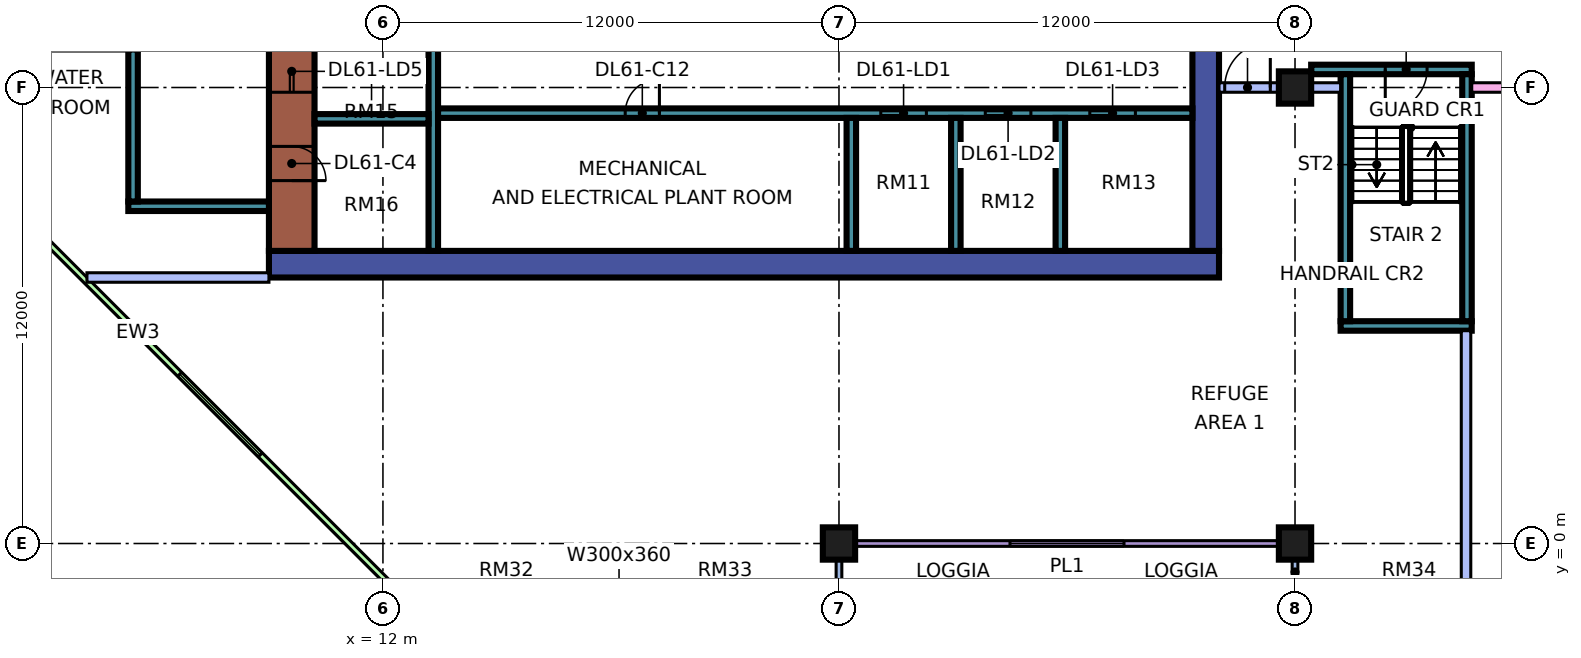
"""IFC4 building model, lengths in metres.
Left out: names, types, materials, properties, quantities, classifications, styles, units other than length and angle.
Written with IfcOpenShell. Run it as: python <this file> out.ifc"""

import sys

from ifc_helpers import new_model, si_unit, direction, frame, frame_2d, origin, origin_2d, place, context, subcontext, project, spatial, rectangle, extrude, element, fill, save


model = new_model("IFC4")
c1 = context("Model", 3, precision=1e-05, world=origin(), true_north=direction((0.0, 1.0)))
c2 = subcontext(c1, "Body", "Model", "MODEL_VIEW")
j1 = project(units=[si_unit("LENGTHUNIT", "METRE"), si_unit("PLANEANGLEUNIT", "RADIAN")], contexts=[c1])
p1 = place(None, origin())
s1 = spatial("IfcSite", under=j1, at=p1, CompositionType="ELEMENT")
p2 = place(p1, origin())
s2 = spatial("IfcBuilding", under=s1, at=p2, CompositionType="ELEMENT")
p3 = place(p2, frame((0.0, 0.0, 256.65)))
s3 = spatial("IfcBuildingStorey", under=s2, at=p3, CompositionType="ELEMENT", Elevation=256.65)
for number, where, z_axis, x_axis in (
    (1, (24.0, 0.0, 0.0), (0.0, 0.0, 1.0), (1.0, 0.0, 0.0)),
    (2, (36.0, 0.0, 0.0), (0.0, 0.0, 1.0), (1.0, 0.0, 0.0)),
    (3, (36.0, 12.0, 0.0), (0.0, 0.0, 1.0), (1.0, 0.0, 0.0)),
):
    element("IfcColumn", number, at=place(p3, frame(where, z_axis=z_axis, x_axis=x_axis)), inside=s3, PredefinedType="COLUMN", context=c2, shape_type="SweptSolid", body=[
        extrude(rectangle(XDim=0.85, YDim=0.85, at=origin_2d()), origin(), (0.0, 0.0, 1.0), 5.5),
    ])
p4 = place(p3, frame((9.0, 7.35, 0.0), z_axis=(0.0, 0.0, 1.0), x_axis=(1.0, 0.0, 0.0)))
e4 = element("IfcWall", 4, at=p4, inside=s3, PredefinedType="SHEAR", context=c2, shape_type="SweptSolid", body=[
    extrude(rectangle(XDim=25.0, YDim=0.7, at=frame_2d((12.5, 0.0))), origin(), (0.0, 0.0, 1.0), 5.5),
])
p5 = place(p3, frame((9.6, 7.7, 0.0), z_axis=(0.0, 0.0, 1.0), x_axis=(0.0, 1.0, 0.0)))
e5 = element("IfcWall", 5, at=p5, inside=s3, PredefinedType="SHEAR", context=c2, shape_type="SweptSolid", body=[
    extrude(rectangle(XDim=11.6, YDim=1.2, at=frame_2d((5.8, 0.0))), origin(), (0.0, 0.0, 1.0), 5.5),
])
p6 = place(p5, frame((4.175, 0.0, 0.0)))
e6 = element("IfcOpeningElement", 6, at=p6, cuts=e5, PredefinedType="OPENING", context=c2, shape_type="SweptSolid", body=[
    extrude(rectangle(XDim=1.1, YDim=2.2, at=frame_2d((0.55, 1.1))), frame((0.0, 0.61, 0.0), z_axis=(0.0, -1.0, 0.0), x_axis=(1.0, 0.0, 0.0)), (0.0, 0.0, 1.0), 1.22),
])
p7 = place(p5, frame((6.675, 0.0, 0.0)))
e7 = element("IfcOpeningElement", 7, at=p7, cuts=e5, PredefinedType="OPENING", context=c2, shape_type="SweptSolid", body=[
    extrude(rectangle(XDim=1.1, YDim=2.2, at=frame_2d((0.55, 1.1))), frame((0.0, 0.61, 0.0), z_axis=(0.0, -1.0, 0.0), x_axis=(1.0, 0.0, 0.0)), (0.0, 0.0, 1.0), 1.22),
])
p8 = place(p5, frame((9.55, 0.0, 0.0)))
e8 = element("IfcOpeningElement", 8, at=p8, cuts=e5, PredefinedType="OPENING", context=c2, shape_type="SweptSolid", body=[
    extrude(rectangle(XDim=1.1, YDim=2.2, at=frame_2d((0.55, 1.1))), frame((0.0, 0.61, 0.0), z_axis=(0.0, -1.0, 0.0), x_axis=(1.0, 0.0, 0.0)), (0.0, 0.0, 1.0), 1.22),
])
p9 = place(p5, frame((1.85, 0.0, 0.0)))
e9 = element("IfcOpeningElement", 9, at=p9, cuts=e5, PredefinedType="OPENING", context=c2, shape_type="SweptSolid", body=[
    extrude(rectangle(XDim=0.9, YDim=2.1, at=frame_2d((0.45, 1.05))), frame((0.0, 0.61, 0.0), z_axis=(0.0, -1.0, 0.0), x_axis=(1.0, 0.0, 0.0)), (0.0, 0.0, 1.0), 1.22),
])
p10 = place(p3, frame((33.65, 7.7, 0.0), z_axis=(0.0, 0.0, 1.0), x_axis=(0.0, 1.0, 0.0)))
e10 = element("IfcWall", 10, at=p10, inside=s3, PredefinedType="SHEAR", context=c2, shape_type="SweptSolid", body=[
    extrude(rectangle(XDim=11.6, YDim=0.7, at=frame_2d((5.8, 0.0))), origin(), (0.0, 0.0, 1.0), 5.5),
])
p11 = place(p10, frame((5.5, 0.0, 0.0)))
e11 = element("IfcOpeningElement", 11, at=p11, cuts=e10, PredefinedType="OPENING", context=c2, shape_type="SweptSolid", body=[
    extrude(rectangle(XDim=1.8, YDim=2.4, at=frame_2d((0.9, 1.2))), frame((0.0, 0.36, 0.0), z_axis=(0.0, -1.0, 0.0), x_axis=(1.0, 0.0, 0.0)), (0.0, 0.0, 1.0), 0.72),
])
p12 = place(p3, frame((13.325, 7.7, 0.0), z_axis=(0.0, 0.0, 1.0), x_axis=(0.0, 1.0, 0.0)))
e12 = element("IfcWall", 12, at=p12, inside=s3, PredefinedType="SHEAR", context=c2, shape_type="SweptSolid", body=[
    extrude(rectangle(XDim=11.6, YDim=0.25, at=frame_2d((5.8, 0.0))), origin(), (0.0, 0.0, 1.0), 5.5),
])
p13 = place(p3, frame((13.45, 11.325, 0.0), z_axis=(0.0, 0.0, 1.0), x_axis=(1.0, 0.0, 0.0)))
e13 = element("IfcWall", 13, at=p13, inside=s3, PredefinedType="SHEAR", context=c2, shape_type="SweptSolid", body=[
    extrude(rectangle(XDim=19.85, YDim=0.25, at=frame_2d((9.925, 0.0))), origin(), (0.0, 0.0, 1.0), 5.5),
])
p14 = place(p13, frame((11.65, 0.0, 0.0)))
e14 = element("IfcOpeningElement", 14, at=p14, cuts=e13, PredefinedType="OPENING", context=c2, shape_type="SweptSolid", body=[
    extrude(rectangle(XDim=1.2, YDim=2.2, at=frame_2d((0.6, 1.1))), frame((0.0, 0.135, 0.0), z_axis=(0.0, -1.0, 0.0), x_axis=(1.0, 0.0, 0.0)), (0.0, 0.0, 1.0), 0.27),
])
p15 = place(p13, frame((14.4, 0.0, 0.0)))
e15 = element("IfcOpeningElement", 15, at=p15, cuts=e13, PredefinedType="OPENING", context=c2, shape_type="SweptSolid", body=[
    extrude(rectangle(XDim=1.2, YDim=2.2, at=frame_2d((0.6, 1.1))), frame((0.0, 0.135, 0.0), z_axis=(0.0, -1.0, 0.0), x_axis=(1.0, 0.0, 0.0)), (0.0, 0.0, 1.0), 0.27),
])
p16 = place(p13, frame((17.15, 0.0, 0.0)))
e16 = element("IfcOpeningElement", 16, at=p16, cuts=e13, PredefinedType="OPENING", context=c2, shape_type="SweptSolid", body=[
    extrude(rectangle(XDim=1.2, YDim=2.2, at=frame_2d((0.6, 1.1))), frame((0.0, 0.135, 0.0), z_axis=(0.0, -1.0, 0.0), x_axis=(1.0, 0.0, 0.0)), (0.0, 0.0, 1.0), 0.27),
])
p17 = place(p13, frame((4.925, 0.0, 0.0)))
e17 = element("IfcOpeningElement", 17, at=p17, cuts=e13, PredefinedType="OPENING", context=c2, shape_type="SweptSolid", body=[
    extrude(rectangle(XDim=0.9, YDim=2.1, at=frame_2d((0.45, 1.05))), frame((0.0, 0.135, 0.0), z_axis=(0.0, -1.0, 0.0), x_axis=(1.0, 0.0, 0.0)), (0.0, 0.0, 1.0), 0.27),
])
p18 = place(p3, frame((10.2, 11.175, 0.0), z_axis=(0.0, 0.0, 1.0), x_axis=(1.0, 0.0, 0.0)))
e18 = element("IfcWall", 18, at=p18, inside=s3, PredefinedType="SHEAR", context=c2, shape_type="SweptSolid", body=[
    extrude(rectangle(XDim=3.0, YDim=0.25, at=frame_2d((1.5, 0.0))), origin(), (0.0, 0.0, 1.0), 5.5),
])
for number, where, z_axis, x_axis in (
    (19, (24.325, 7.7, 0.0), (0.0, 0.0, 1.0), (0.0, 1.0, 0.0)),
    (20, (27.075, 7.7, 0.0), (0.0, 0.0, 1.0), (0.0, 1.0, 0.0)),
    (21, (29.825, 7.7, 0.0), (0.0, 0.0, 1.0), (0.0, 1.0, 0.0)),
):
    element("IfcWall", number, at=place(p3, frame(where, z_axis=z_axis, x_axis=x_axis)), inside=s3, PredefinedType="SHEAR", context=c2, shape_type="SweptSolid", body=[
        extrude(rectangle(XDim=3.5, YDim=0.25, at=frame_2d((1.75, 0.0))), origin(), (0.0, 0.0, 1.0), 5.5),
    ])
p19 = place(p3, frame((5.3, 8.875, 0.0), z_axis=(0.0, 0.0, 1.0), x_axis=(1.0, 0.0, 0.0)))
e22 = element("IfcWall", 22, at=p19, inside=s3, PredefinedType="SHEAR", context=c2, shape_type="SweptSolid", body=[
    extrude(rectangle(XDim=3.7, YDim=0.25, at=frame_2d((1.85, 0.0))), origin(), (0.0, 0.0, 1.0), 5.5),
])
p20 = place(p3, frame((5.425, 9.0, 0.0), z_axis=(0.0, 0.0, 1.0), x_axis=(0.0, 1.0, 0.0)))
e23 = element("IfcWall", 23, at=p20, inside=s3, PredefinedType="SHEAR", context=c2, shape_type="SweptSolid", body=[
    extrude(rectangle(XDim=4.0, YDim=0.25, at=frame_2d((2.0, 0.0))), origin(), (0.0, 0.0, 1.0), 5.5),
])
p21 = place(p3, frame((37.2, 5.725, 0.0), z_axis=(0.0, 0.0, 1.0), x_axis=(1.0, 0.0, 0.0)))
e24 = element("IfcWall", 24, at=p21, inside=s3, PredefinedType="SHEAR", context=c2, shape_type="SweptSolid", body=[
    extrude(rectangle(XDim=3.45, YDim=0.25, at=frame_2d((1.725, 0.0))), origin(), (0.0, 0.0, 1.0), 5.5),
])
p22 = place(p3, frame((36.425, 12.475, 0.0), z_axis=(0.0, 0.0, 1.0), x_axis=(1.0, 0.0, 0.0)))
e25 = element("IfcWall", 25, at=p22, inside=s3, PredefinedType="SHEAR", context=c2, shape_type="SweptSolid", body=[
    extrude(rectangle(XDim=4.225, YDim=0.25, at=frame_2d((2.112, 0.0))), origin(), (0.0, 0.0, 1.0), 5.5),
])
p23 = place(p22, frame((1.95, 0.0, 0.0)))
e26 = element("IfcOpeningElement", 26, at=p23, cuts=e25, PredefinedType="OPENING", context=c2, shape_type="SweptSolid", body=[
    extrude(rectangle(XDim=1.1, YDim=2.2, at=frame_2d((0.55, 1.1))), frame((0.0, 0.135, 0.0), z_axis=(0.0, -1.0, 0.0), x_axis=(1.0, 0.0, 0.0)), (0.0, 0.0, 1.0), 0.27),
])
for number, where, z_axis, x_axis in (
    (27, (37.325, 5.85, 0.0), (0.0, 0.0, 1.0), (0.0, 1.0, 0.0)),
    (28, (40.525, 5.85, 0.0), (0.0, 0.0, 1.0), (0.0, 1.0, 0.0)),
):
    element("IfcWall", number, at=place(p3, frame(where, z_axis=z_axis, x_axis=x_axis)), inside=s3, PredefinedType="SHEAR", context=c2, shape_type="SweptSolid", body=[
        extrude(rectangle(XDim=6.5, YDim=0.25, at=frame_2d((3.25, 0.0))), origin(), (0.0, 0.0, 1.0), 5.5),
    ])
p24 = place(p3, frame((-1.447, 12.553, 0.0), z_axis=(0.0, 0.0, 1.0), x_axis=(0.707106781187, -0.707106781187, 0.0)))
e29 = element("IfcWall", 29, at=p24, inside=s3, PredefinedType="SOLIDWALL", context=c2, shape_type="SweptSolid", body=[
    extrude(rectangle(XDim=19.799, YDim=0.15, at=frame_2d((9.899, 0.0))), origin(), (0.0, 0.0, 1.0), 5.05),
])
p25 = place(p24, frame((11.453, 0.0, 0.45)))
e30 = element("IfcOpeningElement", 30, at=p25, cuts=e29, PredefinedType="OPENING", context=c2, shape_type="SweptSolid", body=[
    extrude(rectangle(XDim=3.0, YDim=3.6, at=frame_2d((1.5, 1.8))), frame((0.0, 0.085, 0.0), z_axis=(0.0, -1.0, 0.0), x_axis=(1.0, 0.0, 0.0)), (0.0, 0.0, 1.0), 0.17),
])
p26 = place(p3, frame((24.075, 0.0, 0.0), z_axis=(0.0, 0.0, 1.0), x_axis=(1.0, 0.0, 0.0)))
e31 = element("IfcWall", 31, at=p26, inside=s3, PredefinedType="SOLIDWALL", context=c2, shape_type="SweptSolid", body=[
    extrude(rectangle(XDim=11.85, YDim=0.15, at=frame_2d((5.925, 0.0))), origin(), (0.0, 0.0, 1.0), 5.05),
])
p27 = place(p26, frame((4.425, 0.0, 0.45)))
e32 = element("IfcOpeningElement", 32, at=p27, cuts=e31, PredefinedType="OPENING", context=c2, shape_type="SweptSolid", body=[
    extrude(rectangle(XDim=3.0, YDim=3.6, at=frame_2d((1.5, 1.8))), frame((0.0, 0.085, 0.0), z_axis=(0.0, -1.0, 0.0), x_axis=(1.0, 0.0, 0.0)), (0.0, 0.0, 1.0), 0.17),
])
for number, where, z_axis, x_axis in (
    (33, (24.0, -1.5, 0.0), (0.0, 0.0, 1.0), (0.0, 1.0, 0.0)),
    (34, (36.0, -1.5, 0.0), (0.0, 0.0, 1.0), (0.0, 1.0, 0.0)),
):
    element("IfcWall", number, at=place(p3, frame(where, z_axis=z_axis, x_axis=x_axis)), inside=s3, PredefinedType="SOLIDWALL", context=c2, shape_type="SweptSolid", body=[
        extrude(rectangle(XDim=1.5, YDim=0.15, at=frame_2d((0.75, 0.0))), origin(), (0.0, 0.0, 1.0), 5.05),
    ])
p28 = place(p3, frame((4.211, 7.0, 0.0), z_axis=(0.0, 0.0, 1.0), x_axis=(1.0, 0.0, 0.0)))
e35 = element("IfcWall", 35, at=p28, inside=s3, PredefinedType="PARTITIONING", context=c2, shape_type="SweptSolid", body=[
    extrude(rectangle(XDim=4.789, YDim=0.25, at=frame_2d((2.395, 0.0))), origin(), (0.0, 0.0, 1.0), 5.05),
])
p29 = place(p3, frame((34.0, 12.0, 0.0), z_axis=(0.0, 0.0, 1.0), x_axis=(1.0, 0.0, 0.0)))
e36 = element("IfcWall", 36, at=p29, inside=s3, PredefinedType="PARTITIONING", context=c2, shape_type="SweptSolid", body=[
    extrude(rectangle(XDim=3.2, YDim=0.25, at=frame_2d((1.6, 0.0))), origin(), (0.0, 0.0, 1.0), 5.05),
])
p30 = place(p29, frame((0.15, 0.0, 0.0)))
e37 = element("IfcOpeningElement", 37, at=p30, cuts=e36, PredefinedType="OPENING", context=c2, shape_type="SweptSolid", body=[
    extrude(rectangle(XDim=1.2, YDim=2.1, at=frame_2d((0.6, 1.05))), frame((0.0, 0.135, 0.0), z_axis=(0.0, -1.0, 0.0), x_axis=(1.0, 0.0, 0.0)), (0.0, 0.0, 1.0), 0.27),
])
p31 = place(p3, frame((40.5, -1.35, 0.0), z_axis=(0.0, 0.0, 1.0), x_axis=(0.0, 1.0, 0.0)))
e38 = element("IfcWall", 38, at=p31, inside=s3, PredefinedType="PARTITIONING", context=c2, shape_type="SweptSolid", body=[
    extrude(rectangle(XDim=6.95, YDim=0.25, at=frame_2d((3.475, 0.0))), origin(), (0.0, 0.0, 1.0), 5.05),
])
p32 = place(p3, frame((40.65, 12.0, 0.0), z_axis=(0.0, 0.0, 1.0), x_axis=(1.0, 0.0, 0.0)))
e39 = element("IfcWall", 39, at=p32, inside=s3, PredefinedType="PARTITIONING", context=c2, shape_type="SweptSolid", body=[
    extrude(rectangle(XDim=22.35, YDim=0.25, at=frame_2d((11.175, 0.0))), origin(), (0.0, 0.0, 1.0), 2.45),
])
p33 = place(p32, frame((5.9, 0.0, 0.0)))
e40 = element("IfcOpeningElement", 40, at=p33, cuts=e39, PredefinedType="OPENING", context=c2, shape_type="SweptSolid", body=[
    extrude(rectangle(XDim=1.8, YDim=2.1, at=frame_2d((0.9, 1.05))), frame((0.0, 0.135, 0.0), z_axis=(0.0, -1.0, 0.0), x_axis=(1.0, 0.0, 0.0)), (0.0, 0.0, 1.0), 0.27),
])
p34 = place(p32, frame((16.75, 0.0, 0.0)))
e41 = element("IfcOpeningElement", 41, at=p34, cuts=e39, PredefinedType="OPENING", context=c2, shape_type="SweptSolid", body=[
    extrude(rectangle(XDim=2.4, YDim=2.1, at=frame_2d((1.2, 1.05))), frame((0.0, 0.135, 0.0), z_axis=(0.0, -1.0, 0.0), x_axis=(1.0, 0.0, 0.0)), (0.0, 0.0, 1.0), 0.27),
])
p35 = place(p25, origin())
e42 = element("IfcWindow", 42, at=p35, inside=s3, PartitioningType="SINGLE_PANEL", PredefinedType="WINDOW", context=c2, shape_type="SweptSolid", body=[
    extrude(rectangle(XDim=3.0, YDim=3.6, at=frame_2d((1.5, 1.8))), frame((0.0, 0.03, 0.0), z_axis=(0.0, -1.0, 0.0), x_axis=(1.0, 0.0, 0.0)), (0.0, 0.0, 1.0), 0.06),
])
fill(e30, e42)
p36 = place(p27, origin())
e43 = element("IfcWindow", 43, at=p36, inside=s3, PartitioningType="SINGLE_PANEL", PredefinedType="WINDOW", context=c2, shape_type="SweptSolid", body=[
    extrude(rectangle(XDim=3.0, YDim=3.6, at=frame_2d((1.5, 1.8))), frame((0.0, 0.03, 0.0), z_axis=(0.0, -1.0, 0.0), x_axis=(1.0, 0.0, 0.0)), (0.0, 0.0, 1.0), 0.06),
])
fill(e32, e43)
p37 = place(p14, origin())
e44 = element("IfcDoor", 44, at=p37, inside=s3, OperationType="DOUBLE_DOOR_SLIDING", PredefinedType="DOOR", context=c2, shape_type="SweptSolid", body=[
    extrude(rectangle(XDim=1.2, YDim=2.2, at=frame_2d((0.6, 1.1))), frame((0.0, 0.025, 0.0), z_axis=(0.0, -1.0, 0.0), x_axis=(1.0, 0.0, 0.0)), (0.0, 0.0, 1.0), 0.05),
])
fill(e14, e44)
p38 = place(p15, origin())
e45 = element("IfcDoor", 45, at=p38, inside=s3, OperationType="DOUBLE_DOOR_SLIDING", PredefinedType="DOOR", context=c2, shape_type="SweptSolid", body=[
    extrude(rectangle(XDim=1.2, YDim=2.2, at=frame_2d((0.6, 1.1))), frame((0.0, 0.025, 0.0), z_axis=(0.0, -1.0, 0.0), x_axis=(1.0, 0.0, 0.0)), (0.0, 0.0, 1.0), 0.05),
])
fill(e15, e45)
p39 = place(p16, origin())
e46 = element("IfcDoor", 46, at=p39, inside=s3, OperationType="DOUBLE_DOOR_SLIDING", PredefinedType="DOOR", context=c2, shape_type="SweptSolid", body=[
    extrude(rectangle(XDim=1.2, YDim=2.2, at=frame_2d((0.6, 1.1))), frame((0.0, 0.025, 0.0), z_axis=(0.0, -1.0, 0.0), x_axis=(1.0, 0.0, 0.0)), (0.0, 0.0, 1.0), 0.05),
])
fill(e16, e46)
p40 = place(p6, origin())
e47 = element("IfcDoor", 47, at=p40, inside=s3, OperationType="DOUBLE_DOOR_SLIDING", PredefinedType="DOOR", context=c2, shape_type="SweptSolid", body=[
    extrude(rectangle(XDim=1.1, YDim=2.2, at=frame_2d((0.55, 1.1))), frame((0.0, 0.025, 0.0), z_axis=(0.0, -1.0, 0.0), x_axis=(1.0, 0.0, 0.0)), (0.0, 0.0, 1.0), 0.05),
])
fill(e6, e47)
p41 = place(p9, frame((0.9, 0.0, 0.0), z_axis=(0.0, 0.0, 1.0), x_axis=(-1.0, 0.0, 0.0)))
e48 = element("IfcDoor", 48, at=p41, inside=s3, OperationType="SINGLE_SWING_LEFT", PredefinedType="DOOR", context=c2, shape_type="SweptSolid", body=[
    extrude(rectangle(XDim=0.9, YDim=2.1, at=frame_2d((0.45, 1.05))), frame((0.0, 0.025, 0.0), z_axis=(0.0, -1.0, 0.0), x_axis=(1.0, 0.0, 0.0)), (0.0, 0.0, 1.0), 0.05),
])
fill(e9, e48)
p42 = place(p23, frame((1.1, 0.0, 0.0), z_axis=(0.0, 0.0, 1.0), x_axis=(-1.0, 0.0, 0.0)))
e49 = element("IfcDoor", 49, at=p42, inside=s3, OperationType="SINGLE_SWING_LEFT", PredefinedType="DOOR", context=c2, shape_type="SweptSolid", body=[
    extrude(rectangle(XDim=1.1, YDim=2.2, at=frame_2d((0.55, 1.1))), frame((0.0, 0.025, 0.0), z_axis=(0.0, -1.0, 0.0), x_axis=(1.0, 0.0, 0.0)), (0.0, 0.0, 1.0), 0.05),
])
fill(e26, e49)
p43 = place(p17, frame((0.9, 0.0, 0.0), z_axis=(0.0, 0.0, 1.0), x_axis=(-1.0, 0.0, 0.0)))
e50 = element("IfcDoor", 50, at=p43, inside=s3, OperationType="SINGLE_SWING_RIGHT", PredefinedType="DOOR", context=c2, shape_type="SweptSolid", body=[
    extrude(rectangle(XDim=0.9, YDim=2.1, at=frame_2d((0.45, 1.05))), frame((0.0, 0.025, 0.0), z_axis=(0.0, -1.0, 0.0), x_axis=(1.0, 0.0, 0.0)), (0.0, 0.0, 1.0), 0.05),
])
fill(e17, e50)
p44 = place(p30, frame((1.2, 0.0, 0.0), z_axis=(0.0, 0.0, 1.0), x_axis=(-1.0, 0.0, 0.0)))
e51 = element("IfcDoor", 51, at=p44, inside=s3, OperationType="SINGLE_SWING_RIGHT", PredefinedType="DOOR", context=c2, shape_type="SweptSolid", body=[
    extrude(rectangle(XDim=1.2, YDim=2.1, at=frame_2d((0.6, 1.05))), frame((0.0, 0.025, 0.0), z_axis=(0.0, -1.0, 0.0), x_axis=(1.0, 0.0, 0.0)), (0.0, 0.0, 1.0), 0.05),
])
fill(e37, e51)
save(model, sys.argv[1])
